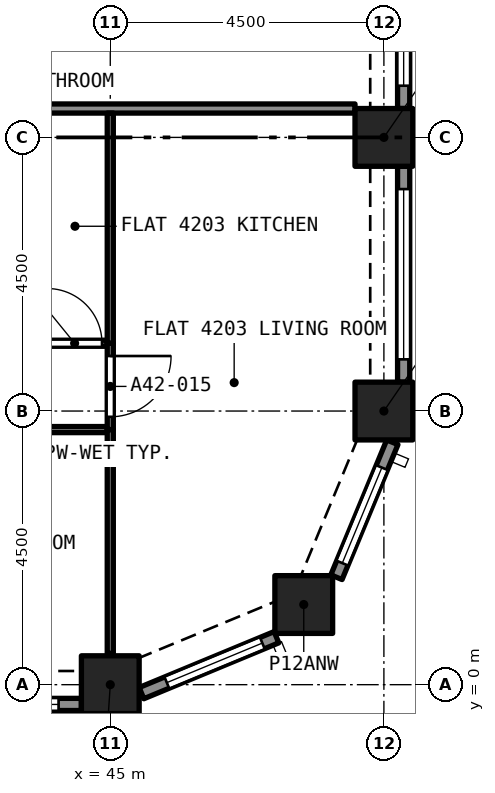
"""IFC4 building model, lengths in metres.
Left out: names, types, materials, properties, quantities, classifications, styles, units other than length and angle.
Written with IfcOpenShell. Run it as: python <this file> out.ifc"""

import sys

from ifc_helpers import new_model, si_unit, direction, frame, frame_2d, origin, origin_2d, place, context, subcontext, project, spatial, rectangle, extrude, element, fill, save


model = new_model("IFC4")
c1 = context("Model", 3, precision=1e-05, world=origin(), true_north=direction((0.0, 1.0)))
c2 = subcontext(c1, "Body", "Model", "MODEL_VIEW")
j1 = project(units=[si_unit("LENGTHUNIT", "METRE"), si_unit("PLANEANGLEUNIT", "RADIAN")], contexts=[c1])
p1 = place(None, origin())
s1 = spatial("IfcSite", under=j1, at=p1, CompositionType="ELEMENT")
p2 = place(p1, origin())
s2 = spatial("IfcBuilding", under=s1, at=p2, CompositionType="ELEMENT")
p3 = place(p2, frame((0.0, 0.0, 150.6)))
s3 = spatial("IfcBuildingStorey", under=s2, at=p3, CompositionType="ELEMENT", Elevation=150.6)
for number, where, z_axis, x_axis in (
    (1, (45.0, 0.0, 0.0), (0.0, 0.0, 1.0), (1.0, 0.0, 0.0)),
    (2, (48.182, 1.318, 0.0), (0.0, 0.0, 1.0), (1.0, 0.0, 0.0)),
    (3, (49.5, 4.5, 0.0), (0.0, 0.0, 1.0), (1.0, 0.0, 0.0)),
    (4, (49.5, 9.0, 0.0), (0.0, 0.0, 1.0), (1.0, 0.0, 0.0)),
):
    element("IfcColumn", number, at=place(p3, frame(where, z_axis=z_axis, x_axis=x_axis)), inside=s3, PredefinedType="COLUMN", context=c2, shape_type="SweptSolid", body=[
        extrude(rectangle(XDim=0.95, YDim=0.95, at=origin_2d()), origin(), (0.0, 0.0, 1.0), 4.4),
    ])
p4 = place(p3, frame((44.525, -0.325, 0.0), z_axis=(0.0, 0.0, 1.0), x_axis=(-1.0, 0.0, 0.0)))
e5 = element("IfcWall", 5, at=p4, inside=s3, PredefinedType="SOLIDWALL", context=c2, shape_type="SweptSolid", body=[
    extrude(rectangle(XDim=3.55, YDim=0.2, at=frame_2d((1.775, 0.0))), origin(), (0.0, 0.0, 1.0), 4.4),
])
p5 = place(p4, frame((0.375, 0.0, 0.45)))
e6 = element("IfcOpeningElement", 6, at=p5, cuts=e5, PredefinedType="OPENING", context=c2, shape_type="SweptSolid", body=[
    extrude(rectangle(XDim=2.8, YDim=2.55, at=frame_2d((1.4, 1.275))), frame((0.0, 0.11, 0.0), z_axis=(0.0, -1.0, 0.0), x_axis=(1.0, 0.0, 0.0)), (0.0, 0.0, 1.0), 0.22),
])
p6 = place(p3, frame((47.733, 0.78, 0.0), z_axis=(0.0, 0.0, 1.0), x_axis=(-0.923880599843, -0.382680855588, 0.0)))
e7 = element("IfcWall", 7, at=p6, inside=s3, PredefinedType="SOLIDWALL", context=c2, shape_type="SweptSolid", body=[
    extrude(rectangle(XDim=2.403, YDim=0.2, at=frame_2d((1.201, 0.0))), origin(), (0.0, 0.0, 1.0), 4.4),
])
p7 = place(p6, frame((0.251, 0.0, 0.45)))
e8 = element("IfcOpeningElement", 8, at=p7, cuts=e7, PredefinedType="OPENING", context=c2, shape_type="SweptSolid", body=[
    extrude(rectangle(XDim=1.7, YDim=2.55, at=frame_2d((0.85, 1.275))), frame((0.0, 0.11, 0.0), z_axis=(0.0, -1.0, 0.0), x_axis=(1.0, 0.0, 0.0)), (0.0, 0.0, 1.0), 0.22),
])
p8 = place(p3, frame((49.639, 3.987, 0.0), z_axis=(0.0, 0.0, 1.0), x_axis=(-0.382680855588, -0.923880599843, 0.0)))
e9 = element("IfcWall", 9, at=p8, inside=s3, PredefinedType="SOLIDWALL", context=c2, shape_type="SweptSolid", body=[
    extrude(rectangle(XDim=2.403, YDim=0.2, at=frame_2d((1.201, 0.0))), origin(), (0.0, 0.0, 1.0), 4.4),
])
p9 = place(p8, frame((0.451, 0.0, 0.45)))
e10 = element("IfcOpeningElement", 10, at=p9, cuts=e9, PredefinedType="OPENING", context=c2, shape_type="SweptSolid", body=[
    extrude(rectangle(XDim=1.7, YDim=2.55, at=frame_2d((0.85, 1.275))), frame((0.0, 0.11, 0.0), z_axis=(0.0, -1.0, 0.0), x_axis=(1.0, 0.0, 0.0)), (0.0, 0.0, 1.0), 0.22),
])
p10 = place(p3, frame((49.825, 8.525, 0.0), z_axis=(0.0, 0.0, 1.0), x_axis=(0.0, -1.0, 0.0)))
e11 = element("IfcWall", 11, at=p10, inside=s3, PredefinedType="SOLIDWALL", context=c2, shape_type="SweptSolid", body=[
    extrude(rectangle(XDim=3.55, YDim=0.2, at=frame_2d((1.775, 0.0))), origin(), (0.0, 0.0, 1.0), 4.4),
])
p11 = place(p10, frame((0.375, 0.0, 0.45)))
e12 = element("IfcOpeningElement", 12, at=p11, cuts=e11, PredefinedType="OPENING", context=c2, shape_type="SweptSolid", body=[
    extrude(rectangle(XDim=2.8, YDim=2.55, at=frame_2d((1.4, 1.275))), frame((0.0, 0.11, 0.0), z_axis=(0.0, -1.0, 0.0), x_axis=(1.0, 0.0, 0.0)), (0.0, 0.0, 1.0), 0.22),
])
p12 = place(p3, frame((49.825, 13.025, 0.0), z_axis=(0.0, 0.0, 1.0), x_axis=(0.0, -1.0, 0.0)))
e13 = element("IfcWall", 13, at=p12, inside=s3, PredefinedType="SOLIDWALL", context=c2, shape_type="SweptSolid", body=[
    extrude(rectangle(XDim=3.55, YDim=0.2, at=frame_2d((1.775, 0.0))), origin(), (0.0, 0.0, 1.0), 4.4),
])
p13 = place(p12, frame((0.375, 0.0, 0.45)))
e14 = element("IfcOpeningElement", 14, at=p13, cuts=e13, PredefinedType="OPENING", context=c2, shape_type="SweptSolid", body=[
    extrude(rectangle(XDim=2.8, YDim=2.55, at=frame_2d((1.4, 1.275))), frame((0.0, 0.11, 0.0), z_axis=(0.0, -1.0, 0.0), x_axis=(1.0, 0.0, 0.0)), (0.0, 0.0, 1.0), 0.22),
])
p14 = place(p3, frame((42.85, 9.475, 0.0), z_axis=(0.0, 0.0, 1.0), x_axis=(1.0, 0.0, 0.0)))
e15 = element("IfcWall", 15, at=p14, inside=s3, PredefinedType="PARTITIONING", context=c2, shape_type="SweptSolid", body=[
    extrude(rectangle(XDim=6.175, YDim=0.15, at=frame_2d((3.087, 0.0))), origin(), (0.0, 0.0, 1.0), 4.1),
])
p15 = place(p3, frame((44.95, 4.195, 0.0), z_axis=(0.0, 0.0, 1.0), x_axis=(-1.0, 0.0, 0.0)))
e16 = element("IfcWall", 16, at=p15, inside=s3, PredefinedType="PARTITIONING", context=c2, shape_type="SweptSolid", body=[
    extrude(rectangle(XDim=4.35, YDim=0.1, at=frame_2d((2.175, 0.0))), origin(), (0.0, 0.0, 1.0), 4.1),
])
p16 = place(p15, frame((1.75, 0.0, 0.0)))
e17 = element("IfcOpeningElement", 17, at=p16, cuts=e16, PredefinedType="OPENING", context=c2, shape_type="SweptSolid", body=[
    extrude(rectangle(XDim=0.9, YDim=2.1, at=frame_2d((0.45, 1.05))), frame((0.0, 0.06, 0.0), z_axis=(0.0, -1.0, 0.0), x_axis=(1.0, 0.0, 0.0)), (0.0, 0.0, 1.0), 0.12),
])
p17 = place(p3, frame((45.0, 0.514, 0.0), z_axis=(0.0, 0.0, 1.0), x_axis=(0.0, 1.0, 0.0)))
e18 = element("IfcWall", 18, at=p17, inside=s3, PredefinedType="PARTITIONING", context=c2, shape_type="SweptSolid", body=[
    extrude(rectangle(XDim=3.681, YDim=0.1, at=frame_2d((1.84, 0.0))), origin(), (0.0, 0.0, 1.0), 4.1),
])
p18 = place(p3, frame((43.827, 5.615, 0.0), z_axis=(0.0, 0.0, 1.0), x_axis=(1.0, 0.0, 0.0)))
e19 = element("IfcWall", 19, at=p18, inside=s3, PredefinedType="PARTITIONING", context=c2, shape_type="SweptSolid", body=[
    extrude(rectangle(XDim=1.123, YDim=0.1, at=frame_2d((0.561, 0.0))), origin(), (0.0, 0.0, 1.0), 4.1),
])
p19 = place(p18, frame((0.136, 0.0, 0.0)))
e20 = element("IfcOpeningElement", 20, at=p19, cuts=e19, PredefinedType="OPENING", context=c2, shape_type="SweptSolid", body=[
    extrude(rectangle(XDim=0.9, YDim=2.1, at=frame_2d((0.45, 1.05))), frame((0.0, 0.06, 0.0), z_axis=(0.0, -1.0, 0.0), x_axis=(1.0, 0.0, 0.0)), (0.0, 0.0, 1.0), 0.12),
])
p20 = place(p3, frame((45.0, 5.615, 0.0), z_axis=(0.0, 0.0, 1.0), x_axis=(0.0, -1.0, 0.0)))
e21 = element("IfcWall", 21, at=p20, inside=s3, PredefinedType="PARTITIONING", context=c2, shape_type="SweptSolid", body=[
    extrude(rectangle(XDim=1.42, YDim=0.1, at=frame_2d((0.71, 0.0))), origin(), (0.0, 0.0, 1.0), 4.1),
])
p21 = place(p20, frame((0.21, 0.0, 0.0)))
e22 = element("IfcOpeningElement", 22, at=p21, cuts=e21, PredefinedType="OPENING", context=c2, shape_type="SweptSolid", body=[
    extrude(rectangle(XDim=1.0, YDim=2.1, at=frame_2d((0.5, 1.05))), frame((0.0, 0.06, 0.0), z_axis=(0.0, -1.0, 0.0), x_axis=(1.0, 0.0, 0.0)), (0.0, 0.0, 1.0), 0.12),
])
p22 = place(p3, frame((45.0, 5.615, 0.0), z_axis=(0.0, 0.0, 1.0), x_axis=(0.0, 1.0, 0.0)))
e23 = element("IfcWall", 23, at=p22, inside=s3, PredefinedType="PARTITIONING", context=c2, shape_type="SweptSolid", body=[
    extrude(rectangle(XDim=3.785, YDim=0.1, at=frame_2d((1.893, 0.0))), origin(), (0.0, 0.0, 1.0), 4.1),
])
p23 = place(p5, origin())
e24 = element("IfcWindow", 24, at=p23, inside=s3, PartitioningType="SINGLE_PANEL", PredefinedType="WINDOW", context=c2, shape_type="SweptSolid", body=[
    extrude(rectangle(XDim=2.8, YDim=2.55, at=frame_2d((1.4, 1.275))), frame((0.0, 0.03, 0.0), z_axis=(0.0, -1.0, 0.0), x_axis=(1.0, 0.0, 0.0)), (0.0, 0.0, 1.0), 0.06),
])
fill(e6, e24)
p24 = place(p7, origin())
e25 = element("IfcWindow", 25, at=p24, inside=s3, PartitioningType="SINGLE_PANEL", PredefinedType="WINDOW", context=c2, shape_type="SweptSolid", body=[
    extrude(rectangle(XDim=1.7, YDim=2.55, at=frame_2d((0.85, 1.275))), frame((0.0, 0.03, 0.0), z_axis=(0.0, -1.0, 0.0), x_axis=(1.0, 0.0, 0.0)), (0.0, 0.0, 1.0), 0.06),
])
fill(e8, e25)
p25 = place(p9, origin())
e26 = element("IfcWindow", 26, at=p25, inside=s3, PartitioningType="SINGLE_PANEL", PredefinedType="WINDOW", context=c2, shape_type="SweptSolid", body=[
    extrude(rectangle(XDim=1.7, YDim=2.55, at=frame_2d((0.85, 1.275))), frame((0.0, 0.03, 0.0), z_axis=(0.0, -1.0, 0.0), x_axis=(1.0, 0.0, 0.0)), (0.0, 0.0, 1.0), 0.06),
])
fill(e10, e26)
p26 = place(p11, origin())
e27 = element("IfcWindow", 27, at=p26, inside=s3, PartitioningType="SINGLE_PANEL", PredefinedType="WINDOW", context=c2, shape_type="SweptSolid", body=[
    extrude(rectangle(XDim=2.8, YDim=2.55, at=frame_2d((1.4, 1.275))), frame((0.0, 0.03, 0.0), z_axis=(0.0, -1.0, 0.0), x_axis=(1.0, 0.0, 0.0)), (0.0, 0.0, 1.0), 0.06),
])
fill(e12, e27)
p27 = place(p13, origin())
e28 = element("IfcWindow", 28, at=p27, inside=s3, PartitioningType="SINGLE_PANEL", PredefinedType="WINDOW", context=c2, shape_type="SweptSolid", body=[
    extrude(rectangle(XDim=2.8, YDim=2.55, at=frame_2d((1.4, 1.275))), frame((0.0, 0.03, 0.0), z_axis=(0.0, -1.0, 0.0), x_axis=(1.0, 0.0, 0.0)), (0.0, 0.0, 1.0), 0.06),
])
fill(e14, e28)
p28 = place(p19, origin())
e29 = element("IfcDoor", 29, at=p28, inside=s3, OperationType="SINGLE_SWING_RIGHT", PredefinedType="DOOR", context=c2, shape_type="SweptSolid", body=[
    extrude(rectangle(XDim=0.9, YDim=2.1, at=frame_2d((0.45, 1.05))), frame((0.0, 0.025, 0.0), z_axis=(0.0, -1.0, 0.0), x_axis=(1.0, 0.0, 0.0)), (0.0, 0.0, 1.0), 0.05),
])
fill(e20, e29)
p29 = place(p21, origin())
e30 = element("IfcDoor", 30, at=p29, inside=s3, OperationType="SINGLE_SWING_RIGHT", PredefinedType="DOOR", context=c2, shape_type="SweptSolid", body=[
    extrude(rectangle(XDim=1.0, YDim=2.1, at=frame_2d((0.5, 1.05))), frame((0.0, 0.025, 0.0), z_axis=(0.0, -1.0, 0.0), x_axis=(1.0, 0.0, 0.0)), (0.0, 0.0, 1.0), 0.05),
])
fill(e22, e30)
save(model, sys.argv[1])
